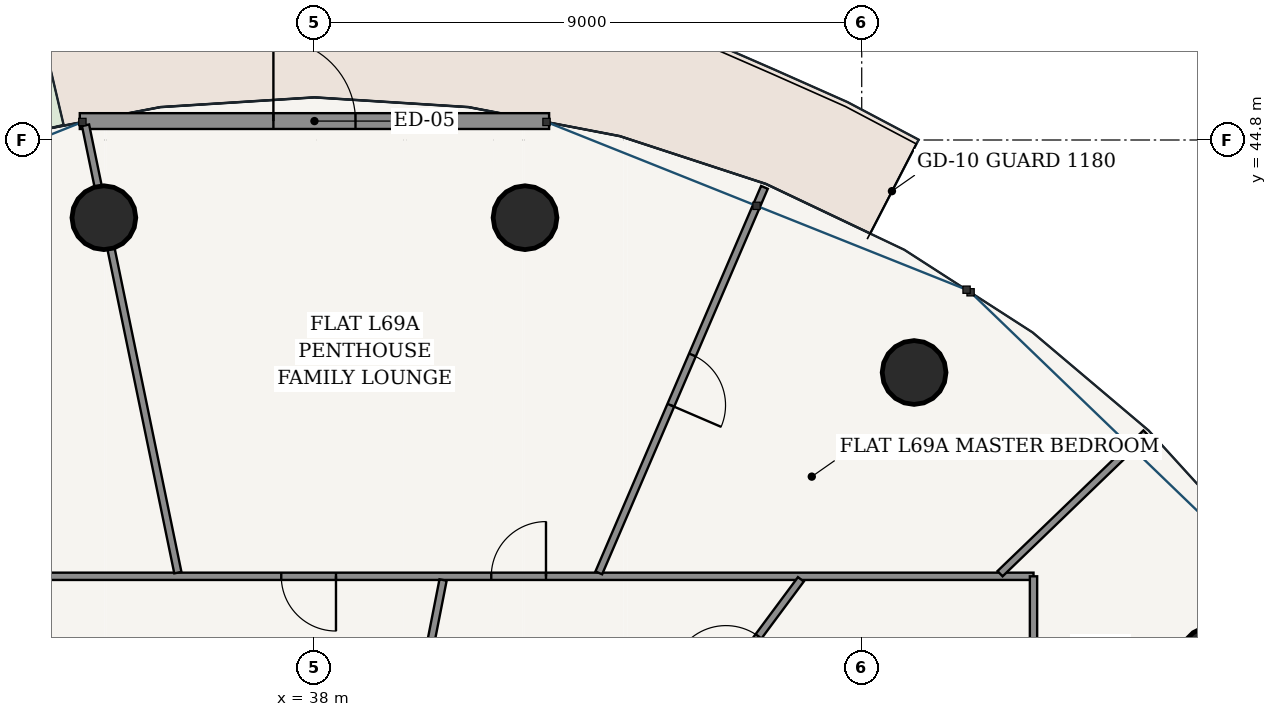
"""IFC4 building model, lengths in metres.
Left out: names, types, materials, properties, quantities, classifications, styles, units other than length and angle.
Written with IfcOpenShell. Run it as: python <this file> out.ifc"""

import sys

from ifc_helpers import new_model, si_unit, direction, frame, frame_2d, origin, origin_2d, place, context, subcontext, project, spatial, rectangle, hollow_circle, extrude, source, transform, mapped, element, fill, save


model = new_model("IFC4")
c1 = context("Model", 3, precision=1e-05, world=origin(), true_north=direction((-0.2419218956, 0.970295726276)))
c2 = subcontext(c1, "Body", "Model", "MODEL_VIEW")
j1 = project(units=[si_unit("LENGTHUNIT", "METRE"), si_unit("PLANEANGLEUNIT", "RADIAN")], contexts=[c1])
p1 = place(None, origin())
s1 = spatial("IfcSite", under=j1, at=p1, CompositionType="ELEMENT")
p2 = place(p1, origin())
s2 = spatial("IfcBuilding", under=s1, at=p2, CompositionType="ELEMENT")
p3 = place(p2, frame((0.0, 0.0, 263.2)))
s3 = spatial("IfcBuildingStorey", under=s2, at=p3, CompositionType="ELEMENT", Elevation=263.2)
for number, where, z_axis, x_axis in (
    (1, (52.759, 36.272, 0.0), (0.0, 0.0, 1.0), (1.0, 0.0, 0.0)),
    (2, (47.861, 40.977, 0.0), (0.0, 0.0, 1.0), (1.0, 0.0, 0.0)),
    (3, (41.463, 43.522, 0.0), (0.0, 0.0, 1.0), (1.0, 0.0, 0.0)),
    (4, (34.537, 43.522, 0.0), (0.0, 0.0, 1.0), (1.0, 0.0, 0.0)),
):
    element("IfcColumn", number, at=place(p3, frame(where, z_axis=z_axis, x_axis=x_axis)), inside=s3, PredefinedType="COLUMN", context=c2, shape_type="SweptSolid", body=[
        extrude(hollow_circle(Radius=0.525, WallThickness=0.035, at=origin_2d()), origin(), (0.0, 0.0, 1.0), 3.75),
    ])
p4 = place(p3, frame((41.859, 45.111, 0.0), z_axis=(0.0, 0.0, 1.0), x_axis=(-1.0, 0.0, 0.0)))
e5 = element("IfcWall", 5, at=p4, inside=s3, PredefinedType="SOLIDWALL", context=c2, shape_type="SweptSolid", body=[
    extrude(rectangle(XDim=7.718, YDim=0.26, at=frame_2d((3.859, 0.0))), origin(), (0.0, 0.0, 1.0), 3.49),
])
p5 = place(p4, frame((3.184, 0.0, 0.0)))
e6 = element("IfcOpeningElement", 6, at=p5, cuts=e5, PredefinedType="OPENING", context=c2, shape_type="SweptSolid", body=[
    extrude(rectangle(XDim=1.35, YDim=2.2, at=frame_2d((0.675, 1.1))), frame((0.0, 0.14, 0.0), z_axis=(0.0, -1.0, 0.0), x_axis=(1.0, 0.0, 0.0)), (0.0, 0.0, 1.0), 0.28),
])
p6 = place(p3, frame((26.175, 37.625, 0.0), z_axis=(0.0, 0.0, 1.0), x_axis=(1.0, 0.0, 0.0)))
e7 = element("IfcWall", 7, at=p6, inside=s3, PredefinedType="PARTITIONING", context=c2, shape_type="SweptSolid", body=[
    extrude(rectangle(XDim=23.65, YDim=0.12, at=frame_2d((11.825, 0.0))), origin(), (0.0, 0.0, 1.0), 3.015),
])
p7 = place(p6, frame((14.733, 0.0, 0.0)))
e8 = element("IfcOpeningElement", 8, at=p7, cuts=e7, PredefinedType="OPENING", context=c2, shape_type="SweptSolid", body=[
    extrude(rectangle(XDim=0.9, YDim=2.15, at=frame_2d((0.45, 1.075))), frame((0.0, 0.07, 0.0), z_axis=(0.0, -1.0, 0.0), x_axis=(1.0, 0.0, 0.0)), (0.0, 0.0, 1.0), 0.14),
])
p8 = place(p6, frame((11.279, 0.0, 0.0)))
e9 = element("IfcOpeningElement", 9, at=p8, cuts=e7, PredefinedType="OPENING", context=c2, shape_type="SweptSolid", body=[
    extrude(rectangle(XDim=0.9, YDim=2.15, at=frame_2d((0.45, 1.075))), frame((0.0, 0.07, 0.0), z_axis=(0.0, -1.0, 0.0), x_axis=(1.0, 0.0, 0.0)), (0.0, 0.0, 1.0), 0.14),
])
p9 = place(p6, frame((2.678, 0.0, 0.0)))
e10 = element("IfcOpeningElement", 10, at=p9, cuts=e7, PredefinedType="OPENING", context=c2, shape_type="SweptSolid", body=[
    extrude(rectangle(XDim=0.9, YDim=2.15, at=frame_2d((0.45, 1.075))), frame((0.0, 0.07, 0.0), z_axis=(0.0, -1.0, 0.0), x_axis=(1.0, 0.0, 0.0)), (0.0, 0.0, 1.0), 0.14),
])
p10 = place(p3, frame((49.825, 37.625, 0.0), z_axis=(0.0, 0.0, 1.0), x_axis=(0.0, -1.0, 0.0)))
e11 = element("IfcWall", 11, at=p10, inside=s3, PredefinedType="PARTITIONING", context=c2, shape_type="SweptSolid", body=[
    extrude(rectangle(XDim=3.615, YDim=0.12, at=frame_2d((1.808, 0.0))), origin(), (0.0, 0.0, 1.0), 3.015),
])
p11 = place(p10, frame((1.357, 0.0, 0.0)))
e12 = element("IfcOpeningElement", 12, at=p11, cuts=e11, PredefinedType="OPENING", context=c2, shape_type="SweptSolid", body=[
    extrude(rectangle(XDim=0.9, YDim=2.15, at=frame_2d((0.45, 1.075))), frame((0.0, 0.07, 0.0), z_axis=(0.0, -1.0, 0.0), x_axis=(1.0, 0.0, 0.0)), (0.0, 0.0, 1.0), 0.14),
])
p12 = place(p3, frame((49.275, 37.668, 0.0), z_axis=(0.0, 0.0, 1.0), x_axis=(0.719954096891, 0.694021684366, 0.0)))
e13 = element("IfcWall", 13, at=p12, inside=s3, PredefinedType="PARTITIONING", context=c2, shape_type="SweptSolid", body=[
    extrude(rectangle(XDim=3.333, YDim=0.12, at=frame_2d((1.667, 0.0))), origin(), (0.0, 0.0, 1.0), 3.121),
])
p13 = place(p3, frame((42.676, 37.682, 0.0), z_axis=(0.0, 0.0, 1.0), x_axis=(0.394777489933, 0.918776759307, 0.0)))
e14 = element("IfcWall", 14, at=p13, inside=s3, PredefinedType="PARTITIONING", context=c2, shape_type="SweptSolid", body=[
    extrude(rectangle(XDim=6.9, YDim=0.12, at=frame_2d((3.45, 0.0))), origin(), (0.0, 0.0, 1.0), 3.121),
])
p14 = place(p13, frame((3.0, 0.0, 0.0)))
e15 = element("IfcOpeningElement", 15, at=p14, cuts=e14, PredefinedType="OPENING", context=c2, shape_type="SweptSolid", body=[
    extrude(rectangle(XDim=0.9, YDim=2.15, at=frame_2d((0.45, 1.075))), frame((0.0, 0.07, 0.0), z_axis=(0.0, -1.0, 0.0), x_axis=(1.0, 0.0, 0.0)), (0.0, 0.0, 1.0), 0.14),
])
p15 = place(p3, frame((35.754, 37.686, 0.0), z_axis=(0.0, 0.0, 1.0), x_axis=(-0.202105877204, 0.979363678313, 0.0)))
e16 = element("IfcWall", 16, at=p15, inside=s3, PredefinedType="PARTITIONING", context=c2, shape_type="SweptSolid", body=[
    extrude(rectangle(XDim=7.512, YDim=0.12, at=frame_2d((3.756, 0.0))), origin(), (0.0, 0.0, 1.0), 3.015),
])
p16 = place(p3, frame((44.07, 34.977, 0.0), z_axis=(0.0, 0.0, 1.0), x_axis=(0.596033679783, 0.802959433947, 0.0)))
e17 = element("IfcWall", 17, at=p16, inside=s3, PredefinedType="PARTITIONING", context=c2, shape_type="SweptSolid", body=[
    extrude(rectangle(XDim=3.236, YDim=0.12, at=frame_2d((1.618, 0.0))), origin(), (0.0, 0.0, 1.0), 3.49),
])
p17 = place(p16, frame((1.168, 0.0, 0.0)))
e18 = element("IfcOpeningElement", 18, at=p17, cuts=e17, PredefinedType="OPENING", context=c2, shape_type="SweptSolid", body=[
    extrude(rectangle(XDim=0.9, YDim=2.15, at=frame_2d((0.45, 1.075))), frame((0.0, 0.07, 0.0), z_axis=(0.0, -1.0, 0.0), x_axis=(1.0, 0.0, 0.0)), (0.0, 0.0, 1.0), 0.14),
])
p18 = place(p3, frame((39.607, 34.977, 0.0), z_axis=(0.0, 0.0, 1.0), x_axis=(0.192785105701, 0.981241001497, 0.0)))
e19 = element("IfcWall", 19, at=p18, inside=s3, PredefinedType="PARTITIONING", context=c2, shape_type="SweptSolid", body=[
    extrude(rectangle(XDim=2.637, YDim=0.12, at=frame_2d((1.318, 0.0))), origin(), (0.0, 0.0, 1.0), 2.575),
])
m1 = source(origin(), c2, "Body", "SweptSolid", [
    extrude(rectangle(XDim=1.35, YDim=2.2, at=frame_2d((0.675, 1.1))), frame((0.0, 0.025, 0.0), z_axis=(0.0, -1.0, 0.0), x_axis=(1.0, 0.0, 0.0)), (0.0, 0.0, 1.0), 0.05),
])
p19 = place(p5, frame((1.35, 0.0, 0.0), z_axis=(0.0, 0.0, 1.0), x_axis=(-1.0, 0.0, 0.0)))
e20 = element("IfcDoor", 20, at=p19, inside=s3, OperationType="SINGLE_SWING_LEFT", PredefinedType="DOOR", context=c2, shape_type="MappedRepresentation", body=[
    mapped(m1, transform((0.0, 0.0, 0.0), scale=1.0)),
])
fill(e6, e20)
m2 = source(origin(), c2, "Body", "SweptSolid", [
    extrude(rectangle(XDim=0.9, YDim=2.15, at=frame_2d((0.45, 1.075))), frame((0.0, 0.025, 0.0), z_axis=(0.0, -1.0, 0.0), x_axis=(1.0, 0.0, 0.0)), (0.0, 0.0, 1.0), 0.05),
])
p20 = place(p17, origin())
e21 = element("IfcDoor", 21, at=p20, inside=s3, OperationType="SINGLE_SWING_LEFT", PredefinedType="DOOR", context=c2, shape_type="MappedRepresentation", body=[
    mapped(m2, transform((0.0, 0.0, 0.0), scale=1.0)),
])
fill(e18, e21)
p21 = place(p7, origin())
e22 = element("IfcDoor", 22, at=p21, inside=s3, OperationType="SINGLE_SWING_RIGHT", PredefinedType="DOOR", context=c2, shape_type="MappedRepresentation", body=[
    mapped(m2, transform((0.0, 0.0, 0.0), scale=1.0)),
])
fill(e8, e22)
p22 = place(p8, frame((0.9, 0.0, 0.0), z_axis=(0.0, 0.0, 1.0), x_axis=(-1.0, 0.0, 0.0)))
e23 = element("IfcDoor", 23, at=p22, inside=s3, OperationType="SINGLE_SWING_LEFT", PredefinedType="DOOR", context=c2, shape_type="MappedRepresentation", body=[
    mapped(m2, transform((0.0, 0.0, 0.0), scale=1.0)),
])
fill(e9, e23)
p23 = place(p14, frame((0.9, 0.0, 0.0), z_axis=(0.0, 0.0, 1.0), x_axis=(-1.0, 0.0, 0.0)))
e24 = element("IfcDoor", 24, at=p23, inside=s3, OperationType="SINGLE_SWING_RIGHT", PredefinedType="DOOR", context=c2, shape_type="MappedRepresentation", body=[
    mapped(m2, transform((0.0, 0.0, 0.0), scale=1.0)),
])
fill(e15, e24)
save(model, sys.argv[1])
